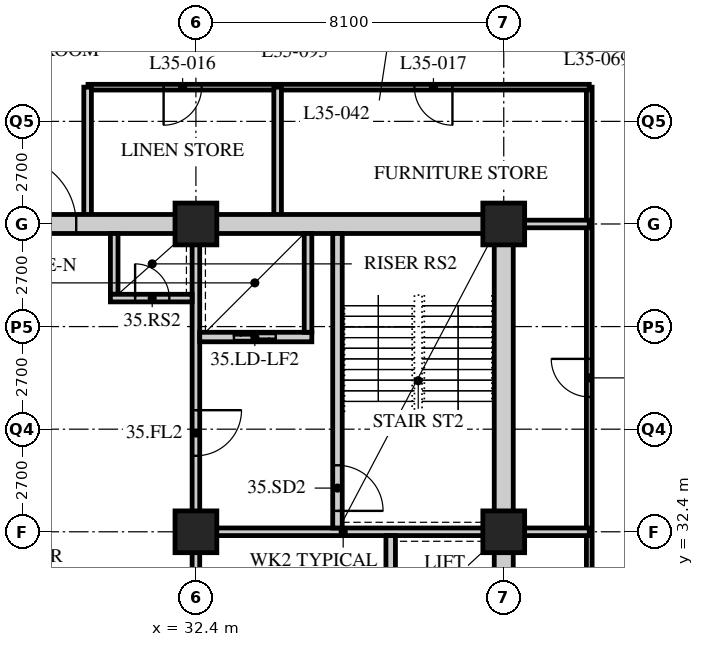
"""IFC4 building model, lengths in metres.
Left out: names, types, materials, properties, quantities, classifications, styles, units other than length and angle.
Written with IfcOpenShell. Run it as: python <this file> out.ifc"""

import sys

from ifc_helpers import new_model, si_unit, direction, frame, frame_2d, origin, origin_2d, place, context, subcontext, project, spatial, rectangle, hollow_rectangle, extrude, element, fill, save


model = new_model("IFC4")
c1 = context("Model", 3, precision=1e-05, world=origin(), true_north=direction((0.0, 1.0)))
c2 = subcontext(c1, "Body", "Model", "MODEL_VIEW")
j1 = project(units=[si_unit("LENGTHUNIT", "METRE"), si_unit("PLANEANGLEUNIT", "RADIAN")], contexts=[c1])
p1 = place(None, origin())
s1 = spatial("IfcSite", under=j1, at=p1, CompositionType="ELEMENT")
p2 = place(p1, origin())
s2 = spatial("IfcBuilding", under=s1, at=p2, CompositionType="ELEMENT")
p3 = place(p2, frame((0.0, 0.0, 137.4)))
s3 = spatial("IfcBuildingStorey", under=s2, at=p3, CompositionType="ELEMENT", Elevation=137.4)
for number, where, z_axis, x_axis in (
    (1, (32.4, 32.4, 0.0), (0.0, 0.0, 1.0), (1.0, 0.0, 0.0)),
    (2, (32.4, 40.5, 0.0), (0.0, 0.0, 1.0), (1.0, 0.0, 0.0)),
    (3, (40.5, 32.4, 0.0), (0.0, 0.0, 1.0), (1.0, 0.0, 0.0)),
    (4, (40.5, 40.5, 0.0), (0.0, 0.0, 1.0), (1.0, 0.0, 0.0)),
):
    element("IfcColumn", number, at=place(p3, frame(where, z_axis=z_axis, x_axis=x_axis)), inside=s3, PredefinedType="COLUMN", context=c2, shape_type="SweptSolid", body=[
        extrude(hollow_rectangle(XDim=1.1, YDim=1.1, WallThickness=0.1, at=origin_2d()), origin(), (0.0, 0.0, 1.0), 3.4),
    ])
p4 = place(p3, frame((42.75, 19.35, 0.0), z_axis=(0.0, 0.0, 1.0), x_axis=(0.0, 1.0, 0.0)))
e5 = element("IfcWall", 5, at=p4, inside=s3, PredefinedType="PARTITIONING", context=c2, shape_type="SweptSolid", body=[
    extrude(rectangle(XDim=24.75, YDim=0.15, at=frame_2d((12.375, 0.0))), origin(), (0.0, 0.0, 1.0), 3.19),
])
p5 = place(p4, frame((8.5, 0.0, 0.0)))
e6 = element("IfcOpeningElement", 6, at=p5, cuts=e5, PredefinedType="OPENING", context=c2, shape_type="SweptSolid", body=[
    extrude(rectangle(XDim=1.0, YDim=2.1, at=frame_2d((0.5, 1.05))), frame((0.0, 0.085, 0.0), z_axis=(0.0, -1.0, 0.0), x_axis=(1.0, 0.0, 0.0)), (0.0, 0.0, 1.0), 0.17),
])
p6 = place(p4, frame((16.6, 0.0, 0.0)))
e7 = element("IfcOpeningElement", 7, at=p6, cuts=e5, PredefinedType="OPENING", context=c2, shape_type="SweptSolid", body=[
    extrude(rectangle(XDim=1.0, YDim=2.1, at=frame_2d((0.5, 1.05))), frame((0.0, 0.085, 0.0), z_axis=(0.0, -1.0, 0.0), x_axis=(1.0, 0.0, 0.0)), (0.0, 0.0, 1.0), 0.17),
])
p7 = place(p3, frame((42.75, 44.1, 0.0), z_axis=(0.0, 0.0, 1.0), x_axis=(-1.0, 0.0, 0.0)))
e8 = element("IfcWall", 8, at=p7, inside=s3, PredefinedType="PARTITIONING", context=c2, shape_type="SweptSolid", body=[
    extrude(rectangle(XDim=13.19, YDim=0.15, at=frame_2d((6.595, 0.0))), origin(), (0.0, 0.0, 1.0), 3.19),
])
p8 = place(p7, frame((10.2, 0.0, 0.0)))
e9 = element("IfcOpeningElement", 9, at=p8, cuts=e8, PredefinedType="OPENING", context=c2, shape_type="SweptSolid", body=[
    extrude(rectangle(XDim=1.0, YDim=2.1, at=frame_2d((0.5, 1.05))), frame((0.0, 0.085, 0.0), z_axis=(0.0, -1.0, 0.0), x_axis=(1.0, 0.0, 0.0)), (0.0, 0.0, 1.0), 0.17),
])
p9 = place(p7, frame((3.6, 0.0, 0.0)))
e10 = element("IfcOpeningElement", 10, at=p9, cuts=e8, PredefinedType="OPENING", context=c2, shape_type="SweptSolid", body=[
    extrude(rectangle(XDim=1.0, YDim=2.1, at=frame_2d((0.5, 1.05))), frame((0.0, 0.085, 0.0), z_axis=(0.0, -1.0, 0.0), x_axis=(1.0, 0.0, 0.0)), (0.0, 0.0, 1.0), 0.17),
])
p10 = place(p3, frame((40.5, 32.4, 0.0), z_axis=(0.0, 0.0, 1.0), x_axis=(1.0, 0.0, 0.0)))
e11 = element("IfcWall", 11, at=p10, inside=s3, PredefinedType="SOLIDWALL", context=c2, shape_type="SweptSolid", body=[
    extrude(rectangle(XDim=2.25, YDim=0.2, at=frame_2d((1.125, 0.0))), origin(), (0.0, 0.0, 1.0), 3.19),
])
for number, where, z_axis, x_axis in (
    (12, (34.55, 44.1, 0.0), (0.0, 0.0, 1.0), (0.0, -1.0, 0.0)),
    (13, (29.55, 40.5, 0.0), (0.0, 0.0, 1.0), (0.0, 1.0, 0.0)),
):
    element("IfcWall", number, at=place(p3, frame(where, z_axis=z_axis, x_axis=x_axis)), inside=s3, PredefinedType="SOLIDWALL", context=c2, shape_type="SweptSolid", body=[
        extrude(rectangle(XDim=3.6, YDim=0.2, at=frame_2d((1.8, 0.0))), origin(), (0.0, 0.0, 1.0), 3.19),
    ])
p11 = place(p3, frame((40.5, 40.5, 0.0), z_axis=(0.0, 0.0, 1.0), x_axis=(1.0, 0.0, 0.0)))
e14 = element("IfcWall", 14, at=p11, inside=s3, PredefinedType="SOLIDWALL", context=c2, shape_type="SweptSolid", body=[
    extrude(rectangle(XDim=2.25, YDim=0.2, at=frame_2d((1.125, 0.0))), origin(), (0.0, 0.0, 1.0), 3.19),
])
p12 = place(p3, frame((15.95, 40.5, 0.0), z_axis=(0.0, 0.0, 1.0), x_axis=(1.0, 0.0, 0.0)))
e15 = element("IfcWall", 15, at=p12, inside=s3, PredefinedType="SOLIDWALL", context=c2, shape_type="SweptSolid", body=[
    extrude(rectangle(XDim=24.8, YDim=0.5, at=frame_2d((12.4, 0.0))), origin(), (0.0, 0.0, 1.0), 2.54),
])
p13 = place(p12, frame((11.5, 0.0, 0.0)))
e16 = element("IfcOpeningElement", 16, at=p13, cuts=e15, PredefinedType="OPENING", context=c2, shape_type="SweptSolid", body=[
    extrude(rectangle(XDim=1.8, YDim=2.4, at=frame_2d((0.9, 1.2))), frame((0.0, 0.26, 0.0), z_axis=(0.0, -1.0, 0.0), x_axis=(1.0, 0.0, 0.0)), (0.0, 0.0, 1.0), 0.52),
])
p14 = place(p3, frame((40.5, 24.55, 0.0), z_axis=(0.0, 0.0, 1.0), x_axis=(0.0, 1.0, 0.0)))
e17 = element("IfcWall", 17, at=p14, inside=s3, PredefinedType="SOLIDWALL", context=c2, shape_type="SweptSolid", body=[
    extrude(rectangle(XDim=15.7, YDim=0.5, at=frame_2d((7.85, 0.0))), origin(), (0.0, 0.0, 1.0), 2.578),
])
p15 = place(p3, frame((32.3, 32.4, 0.0), z_axis=(0.0, 0.0, 1.0), x_axis=(1.0, 0.0, 0.0)))
e18 = element("IfcWall", 18, at=p15, inside=s3, PredefinedType="SOLIDWALL", context=c2, shape_type="SweptSolid", body=[
    extrude(rectangle(XDim=7.95, YDim=0.2, at=frame_2d((3.975, 0.0))), origin(), (0.0, 0.0, 1.0), 2.578),
])
p16 = place(p3, frame((32.4, 32.5, 0.0), z_axis=(0.0, 0.0, 1.0), x_axis=(0.0, 1.0, 0.0)))
e19 = element("IfcWall", 19, at=p16, inside=s3, PredefinedType="SOLIDWALL", context=c2, shape_type="SweptSolid", body=[
    extrude(rectangle(XDim=7.75, YDim=0.2, at=frame_2d((3.875, 0.0))), origin(), (0.0, 0.0, 1.0), 2.578),
])
p17 = place(p16, frame((1.9, 0.0, 0.0)))
e20 = element("IfcOpeningElement", 20, at=p17, cuts=e19, PredefinedType="OPENING", context=c2, shape_type="SweptSolid", body=[
    extrude(rectangle(XDim=1.2, YDim=2.1, at=frame_2d((0.6, 1.05))), frame((0.0, 0.11, 0.0), z_axis=(0.0, -1.0, 0.0), x_axis=(1.0, 0.0, 0.0)), (0.0, 0.0, 1.0), 0.22),
])
p18 = place(p3, frame((37.525, 24.55, 0.0), z_axis=(0.0, 0.0, 1.0), x_axis=(0.0, 1.0, 0.0)))
e21 = element("IfcWall", 21, at=p18, inside=s3, PredefinedType="SOLIDWALL", context=c2, shape_type="SweptSolid", body=[
    extrude(rectangle(XDim=7.75, YDim=0.25, at=frame_2d((3.875, 0.0))), origin(), (0.0, 0.0, 1.0), 3.19),
])
p19 = place(p3, frame((36.125, 32.5, 0.0), z_axis=(0.0, 0.0, 1.0), x_axis=(0.0, 1.0, 0.0)))
e22 = element("IfcWall", 22, at=p19, inside=s3, PredefinedType="SOLIDWALL", context=c2, shape_type="SweptSolid", body=[
    extrude(rectangle(XDim=7.75, YDim=0.25, at=frame_2d((3.875, 0.0))), origin(), (0.0, 0.0, 1.0), 3.19),
])
p20 = place(p19, frame((0.45, 0.0, 0.0)))
e23 = element("IfcOpeningElement", 23, at=p20, cuts=e22, PredefinedType="OPENING", context=c2, shape_type="SweptSolid", body=[
    extrude(rectangle(XDim=1.2, YDim=2.1, at=frame_2d((0.6, 1.05))), frame((0.0, 0.135, 0.0), z_axis=(0.0, -1.0, 0.0), x_axis=(1.0, 0.0, 0.0)), (0.0, 0.0, 1.0), 0.27),
])
p21 = place(p3, frame((32.5, 37.525, 0.0), z_axis=(0.0, 0.0, 1.0), x_axis=(1.0, 0.0, 0.0)))
e24 = element("IfcWall", 24, at=p21, inside=s3, PredefinedType="SOLIDWALL", context=c2, shape_type="SweptSolid", body=[
    extrude(rectangle(XDim=2.95, YDim=0.25, at=frame_2d((1.475, 0.0))), origin(), (0.0, 0.0, 1.0), 3.19),
])
p22 = place(p21, frame((0.9, 0.0, 0.0)))
e25 = element("IfcOpeningElement", 25, at=p22, cuts=e24, PredefinedType="OPENING", context=c2, shape_type="SweptSolid", body=[
    extrude(rectangle(XDim=1.1, YDim=2.4, at=frame_2d((0.55, 1.2))), frame((0.0, 0.135, 0.0), z_axis=(0.0, -1.0, 0.0), x_axis=(1.0, 0.0, 0.0)), (0.0, 0.0, 1.0), 0.27),
])
p23 = place(p3, frame((35.35, 37.65, 0.0), z_axis=(0.0, 0.0, 1.0), x_axis=(0.0, 1.0, 0.0)))
e26 = element("IfcWall", 26, at=p23, inside=s3, PredefinedType="SOLIDWALL", context=c2, shape_type="SweptSolid", body=[
    extrude(rectangle(XDim=2.6, YDim=0.2, at=frame_2d((1.3, 0.0))), origin(), (0.0, 0.0, 1.0), 3.19),
])
p24 = place(p3, frame((30.25, 38.65, 0.0), z_axis=(0.0, 0.0, 1.0), x_axis=(0.0, 1.0, 0.0)))
e27 = element("IfcWall", 27, at=p24, inside=s3, PredefinedType="SOLIDWALL", context=c2, shape_type="SweptSolid", body=[
    extrude(rectangle(XDim=1.6, YDim=0.2, at=frame_2d((0.8, 0.0))), origin(), (0.0, 0.0, 1.0), 3.19),
])
p25 = place(p3, frame((30.15, 38.55, 0.0), z_axis=(0.0, 0.0, 1.0), x_axis=(1.0, 0.0, 0.0)))
e28 = element("IfcWall", 28, at=p25, inside=s3, PredefinedType="SOLIDWALL", context=c2, shape_type="SweptSolid", body=[
    extrude(rectangle(XDim=2.15, YDim=0.2, at=frame_2d((1.075, 0.0))), origin(), (0.0, 0.0, 1.0), 3.19),
])
p26 = place(p25, frame((0.65, 0.0, 0.0)))
e29 = element("IfcOpeningElement", 29, at=p26, cuts=e28, PredefinedType="OPENING", context=c2, shape_type="SweptSolid", body=[
    extrude(rectangle(XDim=0.9, YDim=2.1, at=frame_2d((0.45, 1.05))), frame((0.0, 0.11, 0.0), z_axis=(0.0, -1.0, 0.0), x_axis=(1.0, 0.0, 0.0)), (0.0, 0.0, 1.0), 0.22),
])
p27 = place(p3, frame((32.4, 24.55, 0.0), z_axis=(0.0, 0.0, 1.0), x_axis=(0.0, 1.0, 0.0)))
e30 = element("IfcWall", 30, at=p27, inside=s3, PredefinedType="PARTITIONING", context=c2, shape_type="SweptSolid", body=[
    extrude(rectangle(XDim=7.75, YDim=0.2, at=frame_2d((3.875, 0.0))), origin(), (0.0, 0.0, 1.0), 2.578),
])
p28 = place(p27, frame((0.925, 0.0, 0.0)))
e31 = element("IfcOpeningElement", 31, at=p28, cuts=e30, PredefinedType="OPENING", context=c2, shape_type="SweptSolid", body=[
    extrude(rectangle(XDim=0.9, YDim=2.1, at=frame_2d((0.45, 1.05))), frame((0.0, 0.11, 0.0), z_axis=(0.0, -1.0, 0.0), x_axis=(1.0, 0.0, 0.0)), (0.0, 0.0, 1.0), 0.22),
])
p29 = place(p27, frame((3.275, 0.0, 0.0)))
e32 = element("IfcOpeningElement", 32, at=p29, cuts=e30, PredefinedType="OPENING", context=c2, shape_type="SweptSolid", body=[
    extrude(rectangle(XDim=1.0, YDim=2.1, at=frame_2d((0.5, 1.05))), frame((0.0, 0.11, 0.0), z_axis=(0.0, -1.0, 0.0), x_axis=(1.0, 0.0, 0.0)), (0.0, 0.0, 1.0), 0.22),
])
p30 = place(p27, frame((5.775, 0.0, 0.0)))
e33 = element("IfcOpeningElement", 33, at=p30, cuts=e30, PredefinedType="OPENING", context=c2, shape_type="SweptSolid", body=[
    extrude(rectangle(XDim=1.0, YDim=2.1, at=frame_2d((0.5, 1.05))), frame((0.0, 0.11, 0.0), z_axis=(0.0, -1.0, 0.0), x_axis=(1.0, 0.0, 0.0)), (0.0, 0.0, 1.0), 0.22),
])
p31 = place(p6, origin())
e34 = element("IfcDoor", 34, at=p31, inside=s3, OperationType="SINGLE_SWING_RIGHT", PredefinedType="DOOR", context=c2, shape_type="SweptSolid", body=[
    extrude(rectangle(XDim=1.0, YDim=2.1, at=frame_2d((0.5, 1.05))), frame((0.0, 0.025, 0.0), z_axis=(0.0, -1.0, 0.0), x_axis=(1.0, 0.0, 0.0)), (0.0, 0.0, 1.0), 0.05),
])
fill(e7, e34)
p32 = place(p8, origin())
e35 = element("IfcDoor", 35, at=p32, inside=s3, OperationType="SINGLE_SWING_RIGHT", PredefinedType="DOOR", context=c2, shape_type="SweptSolid", body=[
    extrude(rectangle(XDim=1.0, YDim=2.1, at=frame_2d((0.5, 1.05))), frame((0.0, 0.025, 0.0), z_axis=(0.0, -1.0, 0.0), x_axis=(1.0, 0.0, 0.0)), (0.0, 0.0, 1.0), 0.05),
])
fill(e9, e35)
p33 = place(p9, origin())
e36 = element("IfcDoor", 36, at=p33, inside=s3, OperationType="SINGLE_SWING_LEFT", PredefinedType="DOOR", context=c2, shape_type="SweptSolid", body=[
    extrude(rectangle(XDim=1.0, YDim=2.1, at=frame_2d((0.5, 1.05))), frame((0.0, 0.025, 0.0), z_axis=(0.0, -1.0, 0.0), x_axis=(1.0, 0.0, 0.0)), (0.0, 0.0, 1.0), 0.05),
])
fill(e10, e36)
p34 = place(p20, origin())
e37 = element("IfcDoor", 37, at=p34, inside=s3, OperationType="SINGLE_SWING_RIGHT", PredefinedType="DOOR", context=c2, shape_type="SweptSolid", body=[
    extrude(rectangle(XDim=1.2, YDim=2.1, at=frame_2d((0.6, 1.05))), frame((0.0, 0.025, 0.0), z_axis=(0.0, -1.0, 0.0), x_axis=(1.0, 0.0, 0.0)), (0.0, 0.0, 1.0), 0.05),
])
fill(e23, e37)
p35 = place(p17, origin())
e38 = element("IfcDoor", 38, at=p35, inside=s3, OperationType="SINGLE_SWING_LEFT", PredefinedType="DOOR", context=c2, shape_type="SweptSolid", body=[
    extrude(rectangle(XDim=1.2, YDim=2.1, at=frame_2d((0.6, 1.05))), frame((0.0, 0.025, 0.0), z_axis=(0.0, -1.0, 0.0), x_axis=(1.0, 0.0, 0.0)), (0.0, 0.0, 1.0), 0.05),
])
fill(e20, e38)
p36 = place(p26, origin())
e39 = element("IfcDoor", 39, at=p36, inside=s3, OperationType="SINGLE_SWING_LEFT", PredefinedType="DOOR", context=c2, shape_type="SweptSolid", body=[
    extrude(rectangle(XDim=0.9, YDim=2.1, at=frame_2d((0.45, 1.05))), frame((0.0, 0.025, 0.0), z_axis=(0.0, -1.0, 0.0), x_axis=(1.0, 0.0, 0.0)), (0.0, 0.0, 1.0), 0.05),
])
fill(e29, e39)
p37 = place(p22, origin())
e40 = element("IfcDoor", 40, at=p37, inside=s3, OperationType="DOUBLE_DOOR_SLIDING", PredefinedType="DOOR", context=c2, shape_type="SweptSolid", body=[
    extrude(rectangle(XDim=1.1, YDim=2.4, at=frame_2d((0.55, 1.2))), frame((0.0, 0.025, 0.0), z_axis=(0.0, -1.0, 0.0), x_axis=(1.0, 0.0, 0.0)), (0.0, 0.0, 1.0), 0.05),
])
fill(e25, e40)
p38 = place(p13, origin())
e41 = element("IfcDoor", 41, at=p38, inside=s3, OperationType="DOUBLE_DOOR_SINGLE_SWING", PredefinedType="DOOR", context=c2, shape_type="SweptSolid", body=[
    extrude(rectangle(XDim=1.8, YDim=2.4, at=frame_2d((0.9, 1.2))), frame((0.0, 0.025, 0.0), z_axis=(0.0, -1.0, 0.0), x_axis=(1.0, 0.0, 0.0)), (0.0, 0.0, 1.0), 0.05),
])
fill(e16, e41)
save(model, sys.argv[1])
